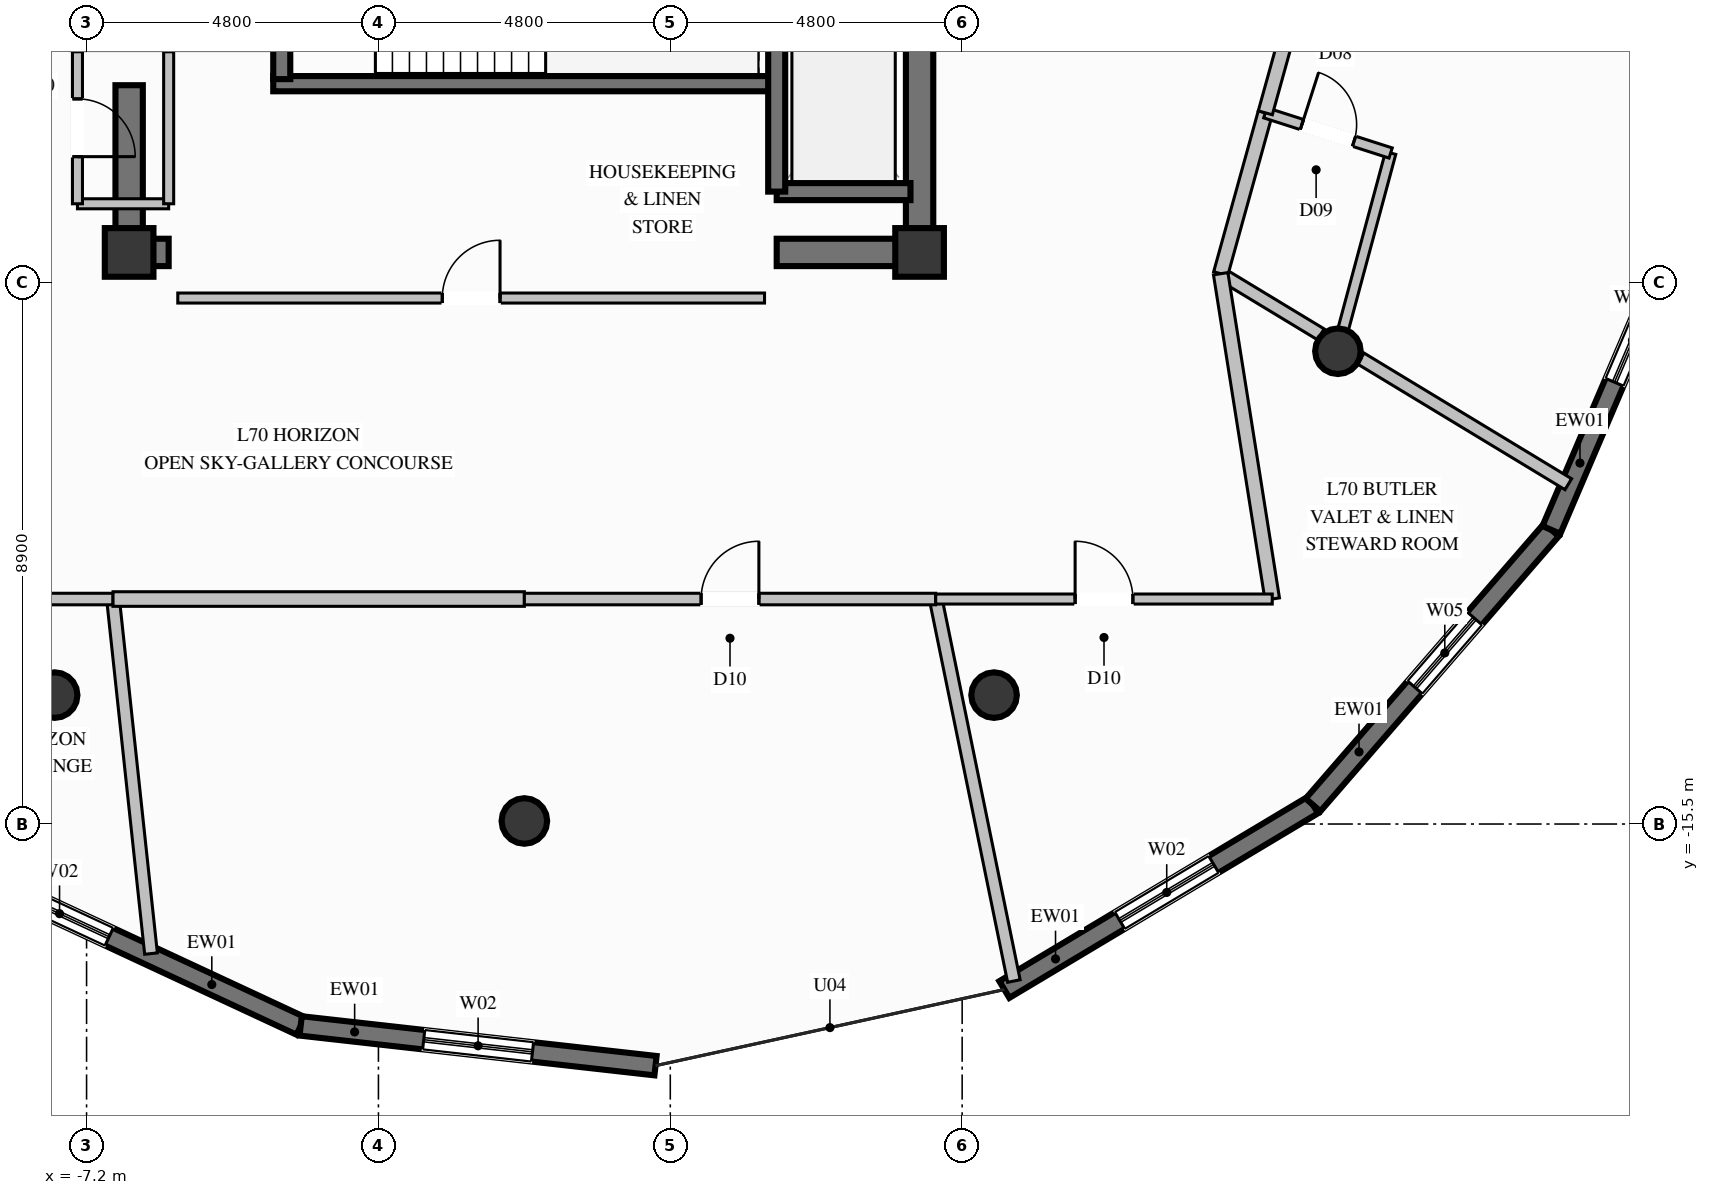
"""IFC4 building model, lengths in metres.
Left out: names, types, materials, properties, quantities, classifications, styles, units other than length and angle.
Written with IfcOpenShell. Run it as: python <this file> out.ifc"""

import sys

from ifc_helpers import new_model, si_unit, direction, frame, frame_2d, origin, origin_2d, place, context, subcontext, project, spatial, rectangle, circle, extrude, element, fill, save


model = new_model("IFC4")
c1 = context("Model", 3, precision=1e-05, world=origin(), true_north=direction((0.0, 1.0)))
c2 = subcontext(c1, "Body", "Model", "MODEL_VIEW")
j1 = project(units=[si_unit("LENGTHUNIT", "METRE"), si_unit("PLANEANGLEUNIT", "RADIAN")], contexts=[c1])
p1 = place(None, origin())
s1 = spatial("IfcSite", under=j1, at=p1, CompositionType="ELEMENT")
p2 = place(p1, origin())
s2 = spatial("IfcBuilding", under=s1, at=p2, CompositionType="ELEMENT")
p3 = place(p2, frame((0.0, 0.0, 270.6)))
s3 = spatial("IfcBuildingStorey", under=s2, at=p3, CompositionType="ELEMENT", Elevation=270.6)
for number, where, z_axis, x_axis in (
    (1, (-6.5, -6.1, 0.0), (0.0, 0.0, 1.0), (1.0, 0.0, 0.0)),
    (2, (6.5, -6.1, 0.0), (0.0, 0.0, 1.0), (1.0, 0.0, 0.0)),
):
    element("IfcColumn", number, at=place(p3, frame(where, z_axis=z_axis, x_axis=x_axis)), inside=s3, PredefinedType="COLUMN", context=c2, shape_type="SweptSolid", body=[
        extrude(rectangle(XDim=0.8, YDim=0.8, at=origin_2d()), origin(), (0.0, 0.0, 1.0), 3.8),
    ])
p4 = place(p3, frame((-4.13, -3.325, 0.0), z_axis=(0.0, 0.0, 1.0), x_axis=(1.0, 0.0, 0.0)))
e3 = element("IfcWall", 3, at=p4, inside=s3, PredefinedType="SOLIDWALL", context=c2, shape_type="SweptSolid", body=[
    extrude(rectangle(XDim=8.26, YDim=0.25, at=frame_2d((4.13, 0.0))), origin(), (0.0, 0.0, 1.0), 3.8),
])
p5 = place(p3, frame((-6.275, -6.1, 0.0), z_axis=(0.0, 0.0, 1.0), x_axis=(1.0, 0.0, 0.0)))
e4 = element("IfcWall", 4, at=p5, inside=s3, PredefinedType="SHEAR", context=c2, shape_type="SweptSolid", body=[
    extrude(rectangle(XDim=0.425, YDim=0.45, at=frame_2d((0.212, 0.0))), origin(), (0.0, 0.0, 1.0), 3.8),
])
p6 = place(p3, frame((4.15, -6.1, 0.0), z_axis=(0.0, 0.0, 1.0), x_axis=(1.0, 0.0, 0.0)))
e5 = element("IfcWall", 5, at=p6, inside=s3, PredefinedType="SHEAR", context=c2, shape_type="SweptSolid", body=[
    extrude(rectangle(XDim=2.125, YDim=0.45, at=frame_2d((1.062, 0.0))), origin(), (0.0, 0.0, 1.0), 3.8),
])
p7 = place(p3, frame((-6.5, -6.325, 0.0), z_axis=(0.0, 0.0, 1.0), x_axis=(0.0, 1.0, 0.0)))
e6 = element("IfcWall", 6, at=p7, inside=s3, PredefinedType="SHEAR", context=c2, shape_type="SweptSolid", body=[
    extrude(rectangle(XDim=2.975, YDim=0.45, at=frame_2d((1.487, 0.0))), origin(), (0.0, 0.0, 1.0), 3.8),
])
p8 = place(p3, frame((6.5, -6.325, 0.0), z_axis=(0.0, 0.0, 1.0), x_axis=(0.0, 1.0, 0.0)))
e7 = element("IfcWall", 7, at=p8, inside=s3, PredefinedType="SHEAR", context=c2, shape_type="SweptSolid", body=[
    extrude(rectangle(XDim=3.975, YDim=0.45, at=frame_2d((1.987, 0.0))), origin(), (0.0, 0.0, 1.0), 3.8),
])
for number, where, z_axis, x_axis in (
    (8, (-7.725, -13.38, 0.0), (0.0, 0.0, 1.0), (1.0, 0.0, 0.0)),
    (9, (0.0, -15.45, 0.0), (0.0, 0.0, 1.0), (1.0, 0.0, 0.0)),
    (10, (7.725, -13.38, 0.0), (0.0, 0.0, 1.0), (1.0, 0.0, 0.0)),
    (11, (13.38, -7.725, 0.0), (0.0, 0.0, 1.0), (1.0, 0.0, 0.0)),
):
    element("IfcColumn", number, at=place(p3, frame(where, z_axis=z_axis, x_axis=x_axis)), inside=s3, PredefinedType="COLUMN", context=c2, shape_type="SweptSolid", body=[
        extrude(circle(Radius=0.375, at=origin_2d()), origin(), (0.0, 0.0, 1.0), 3.8),
    ])
p9 = place(p3, frame((12.971, -15.186, 0.0), z_axis=(0.0, 0.0, 1.0), x_axis=(-0.858256729209, -0.513220602439, 0.0)))
e12 = element("IfcWall", 12, at=p9, inside=s3, PredefinedType="SOLIDWALL", context=c2, shape_type="SweptSolid", body=[
    extrude(rectangle(XDim=5.915, YDim=0.32, at=frame_2d((2.958, 0.0))), origin(), (0.0, 0.0, 1.0), 3.57),
])
p10 = place(p9, frame((1.904, 0.0, 0.35)))
e13 = element("IfcOpeningElement", 13, at=p10, cuts=e12, PredefinedType="OPENING", context=c2, shape_type="SweptSolid", body=[
    extrude(rectangle(XDim=1.8, YDim=2.6, at=frame_2d((0.9, 1.3))), frame((0.0, 0.17, 0.0), z_axis=(0.0, -1.0, 0.0), x_axis=(1.0, 0.0, 0.0)), (0.0, 0.0, 1.0), 0.34),
])
p11 = place(p3, frame((16.891, -10.663, 0.0), z_axis=(0.0, 0.0, 1.0), x_axis=(-0.654956937311, -0.755666202941, 0.0)))
e14 = element("IfcWall", 14, at=p11, inside=s3, PredefinedType="SOLIDWALL", context=c2, shape_type="SweptSolid", body=[
    extrude(rectangle(XDim=5.985, YDim=0.32, at=frame_2d((2.993, 0.0))), origin(), (0.0, 0.0, 1.0), 3.57),
])
p12 = place(p11, frame((1.927, 0.0, 0.85)))
e15 = element("IfcOpeningElement", 15, at=p12, cuts=e14, PredefinedType="OPENING", context=c2, shape_type="SweptSolid", body=[
    extrude(rectangle(XDim=1.5, YDim=1.2, at=frame_2d((0.75, 0.6))), frame((0.0, 0.17, 0.0), z_axis=(0.0, -1.0, 0.0), x_axis=(1.0, 0.0, 0.0)), (0.0, 0.0, 1.0), 0.34),
])
p13 = place(p3, frame((19.27, -5.097, 0.0), z_axis=(0.0, 0.0, 1.0), x_axis=(-0.392999104836, -0.919538853773, 0.0)))
e16 = element("IfcWall", 16, at=p13, inside=s3, PredefinedType="SOLIDWALL", context=c2, shape_type="SweptSolid", body=[
    extrude(rectangle(XDim=6.053, YDim=0.32, at=frame_2d((3.027, 0.0))), origin(), (0.0, 0.0, 1.0), 3.57),
])
p14 = place(p13, frame((1.912, 0.0, 0.85)))
e17 = element("IfcOpeningElement", 17, at=p14, cuts=e16, PredefinedType="OPENING", context=c2, shape_type="SweptSolid", body=[
    extrude(rectangle(XDim=1.5, YDim=1.2, at=frame_2d((0.75, 0.6))), frame((0.0, 0.17, 0.0), z_axis=(0.0, -1.0, 0.0), x_axis=(1.0, 0.0, 0.0)), (0.0, 0.0, 1.0), 0.34),
])
p15 = place(p3, frame((-3.679, -18.82, 0.0), z_axis=(0.0, 0.0, 1.0), x_axis=(-0.90661391217, 0.421961152548, 0.0)))
e18 = element("IfcWall", 18, at=p15, inside=s3, PredefinedType="SOLIDWALL", context=c2, shape_type="SweptSolid", body=[
    extrude(rectangle(XDim=5.916, YDim=0.32, at=frame_2d((2.958, 0.0))), origin(), (0.0, 0.0, 1.0), 3.57),
])
p16 = place(p15, frame((3.474, 0.0, 0.35)))
e19 = element("IfcOpeningElement", 19, at=p16, cuts=e18, PredefinedType="OPENING", context=c2, shape_type="SweptSolid", body=[
    extrude(rectangle(XDim=1.8, YDim=2.6, at=frame_2d((0.9, 1.3))), frame((0.0, 0.17, 0.0), z_axis=(0.0, -1.0, 0.0), x_axis=(1.0, 0.0, 0.0)), (0.0, 0.0, 1.0), 0.34),
])
p17 = place(p3, frame((2.157, -19.474, 0.0), z_axis=(0.0, 0.0, 1.0), x_axis=(-0.993778337548, 0.111376010973, 0.0)))
e20 = element("IfcWall", 20, at=p17, inside=s3, PredefinedType="SOLIDWALL", context=c2, shape_type="SweptSolid", body=[
    extrude(rectangle(XDim=5.873, YDim=0.32, at=frame_2d((2.936, 0.0))), origin(), (0.0, 0.0, 1.0), 3.57),
])
p18 = place(p17, frame((2.036, 0.0, 0.35)))
e21 = element("IfcOpeningElement", 21, at=p18, cuts=e20, PredefinedType="OPENING", context=c2, shape_type="SweptSolid", body=[
    extrude(rectangle(XDim=1.8, YDim=2.6, at=frame_2d((0.9, 1.3))), frame((0.0, 0.17, 0.0), z_axis=(0.0, -1.0, 0.0), x_axis=(1.0, 0.0, 0.0)), (0.0, 0.0, 1.0), 0.34),
])
p19 = place(p3, frame((4.15, -5.1, 0.0), z_axis=(0.0, 0.0, 1.0), x_axis=(1.0, 0.0, 0.0)))
e22 = element("IfcWall", 22, at=p19, inside=s3, PredefinedType="SOLIDWALL", context=c2, shape_type="SweptSolid", body=[
    extrude(rectangle(XDim=2.2, YDim=0.28, at=frame_2d((1.1, 0.0))), origin(), (0.0, 0.0, 1.0), 3.57),
])
p20 = place(p3, frame((4.15, -2.4, 0.0), z_axis=(0.0, 0.0, 1.0), x_axis=(0.0, -1.0, 0.0)))
e23 = element("IfcWall", 23, at=p20, inside=s3, PredefinedType="SOLIDWALL", context=c2, shape_type="SweptSolid", body=[
    extrude(rectangle(XDim=2.7, YDim=0.28, at=frame_2d((1.35, 0.0))), origin(), (0.0, 0.0, 1.0), 3.57),
])
p21 = place(p3, frame((-3.99, -3.25, 0.0), z_axis=(0.0, 0.0, 1.0), x_axis=(0.0, 1.0, 0.0)))
e24 = element("IfcWall", 24, at=p21, inside=s3, PredefinedType="SOLIDWALL", context=c2, shape_type="SweptSolid", body=[
    extrude(rectangle(XDim=5.46, YDim=0.28, at=frame_2d((2.73, 0.0))), origin(), (0.0, 0.0, 1.0), 3.57),
])
p22 = place(p21, frame((0.937, 0.0, 0.0)))
e25 = element("IfcOpeningElement", 25, at=p22, cuts=e24, PredefinedType="OPENING", context=c2, shape_type="SweptSolid", body=[
    extrude(rectangle(XDim=1.2, YDim=2.2, at=frame_2d((0.6, 1.1))), frame((0.0, 0.15, 0.0), z_axis=(0.0, -1.0, 0.0), x_axis=(1.0, 0.0, 0.0)), (0.0, 0.0, 1.0), 0.3),
])
p23 = place(p3, frame((-7.35, -5.3, 0.0), z_axis=(0.0, 0.0, 1.0), x_axis=(1.0, 0.0, 0.0)))
e26 = element("IfcWall", 26, at=p23, inside=s3, PredefinedType="PARTITIONING", context=c2, shape_type="SweptSolid", body=[
    extrude(rectangle(XDim=1.5, YDim=0.165, at=frame_2d((0.75, 0.0))), origin(), (0.0, 0.0, 1.0), 2.655),
])
p24 = place(p3, frame((-5.85, -5.3, 0.0), z_axis=(0.0, 0.0, 1.0), x_axis=(0.0, 1.0, 0.0)))
e27 = element("IfcWall", 27, at=p24, inside=s3, PredefinedType="PARTITIONING", context=c2, shape_type="SweptSolid", body=[
    extrude(rectangle(XDim=2.5, YDim=0.165, at=frame_2d((1.25, 0.0))), origin(), (0.0, 0.0, 1.0), 2.655),
])
p25 = place(p3, frame((-7.35, -2.8, 0.0), z_axis=(0.0, 0.0, 1.0), x_axis=(0.0, -1.0, 0.0)))
e28 = element("IfcWall", 28, at=p25, inside=s3, PredefinedType="PARTITIONING", context=c2, shape_type="SweptSolid", body=[
    extrude(rectangle(XDim=2.5, YDim=0.165, at=frame_2d((1.25, 0.0))), origin(), (0.0, 0.0, 1.0), 3.57),
])
p26 = place(p25, frame((0.775, 0.0, 0.0)))
e29 = element("IfcOpeningElement", 29, at=p26, cuts=e28, PredefinedType="OPENING", context=c2, shape_type="SweptSolid", body=[
    extrude(rectangle(XDim=0.95, YDim=2.1, at=frame_2d((0.475, 1.05))), frame((0.0, 0.093, 0.0), z_axis=(0.0, -1.0, 0.0), x_axis=(1.0, 0.0, 0.0)), (0.0, 0.0, 1.0), 0.185),
])
p27 = place(p3, frame((-5.7, -6.85, 0.0), z_axis=(0.0, 0.0, 1.0), x_axis=(1.0, 0.0, 0.0)))
e30 = element("IfcWall", 30, at=p27, inside=s3, PredefinedType="PARTITIONING", context=c2, shape_type="SweptSolid", body=[
    extrude(rectangle(XDim=9.65, YDim=0.165, at=frame_2d((4.825, 0.0))), origin(), (0.0, 0.0, 1.0), 2.655),
])
p28 = place(p27, frame((4.35, 0.0, 0.0)))
e31 = element("IfcOpeningElement", 31, at=p28, cuts=e30, PredefinedType="OPENING", context=c2, shape_type="SweptSolid", body=[
    extrude(rectangle(XDim=0.95, YDim=2.1, at=frame_2d((0.475, 1.05))), frame((0.0, 0.093, 0.0), z_axis=(0.0, -1.0, 0.0), x_axis=(1.0, 0.0, 0.0)), (0.0, 0.0, 1.0), 0.185),
])
p29 = place(p3, frame((11.452, -6.45, 0.0), z_axis=(0.0, 0.0, 1.0), x_axis=(0.85548381957, -0.517829541889, 0.0)))
e32 = element("IfcWall", 32, at=p29, inside=s3, PredefinedType="PARTITIONING", context=c2, shape_type="SweptSolid", body=[
    extrude(rectangle(XDim=1.926, YDim=0.21, at=frame_2d((0.963, 0.0))), origin(), (0.0, 0.0, 1.0), 3.011),
])
p30 = place(p3, frame((13.756, -7.845, 0.0), z_axis=(0.0, 0.0, 1.0), x_axis=(0.855336694692, -0.518072522638, 0.0)))
e33 = element("IfcWall", 33, at=p30, inside=s3, PredefinedType="PARTITIONING", context=c2, shape_type="SweptSolid", body=[
    extrude(rectangle(XDim=3.99, YDim=0.21, at=frame_2d((1.995, 0.0))), origin(), (0.0, 0.0, 1.0), 3.57),
])
p31 = place(p3, frame((11.452, -6.45, 0.0), z_axis=(0.0, 0.0, 1.0), x_axis=(0.267350374135, 0.963599386389, 0.0)))
e34 = element("IfcWall", 34, at=p31, inside=s3, PredefinedType="PARTITIONING", context=c2, shape_type="SweptSolid", body=[
    extrude(rectangle(XDim=2.746, YDim=0.24, at=frame_2d((1.373, 0.0))), origin(), (0.0, 0.0, 1.0), 3.57),
])
p32 = place(p3, frame((13.396, -7.627, 0.0), z_axis=(0.0, 0.0, 1.0), x_axis=(0.259917321364, 0.965630874638, 0.0)))
e35 = element("IfcWall", 35, at=p32, inside=s3, PredefinedType="PLUMBINGWALL", context=c2, shape_type="SweptSolid", body=[
    extrude(rectangle(XDim=3.274, YDim=0.175, at=frame_2d((1.637, 0.0))), origin(), (0.0, 0.0, 1.0), 3.138),
])
p33 = place(p3, frame((12.186, -3.804, 0.0), z_axis=(0.0, 0.0, 1.0), x_axis=(0.952209126852, -0.305446850926, 0.0)))
e36 = element("IfcWall", 36, at=p33, inside=s3, PredefinedType="PLUMBINGWALL", context=c2, shape_type="SweptSolid", body=[
    extrude(rectangle(XDim=2.165, YDim=0.175, at=frame_2d((1.082, 0.0))), origin(), (0.0, 0.0, 1.0), 3.57),
])
p34 = place(p33, frame((0.632, 0.0, 0.0)))
e37 = element("IfcOpeningElement", 37, at=p34, cuts=e36, PredefinedType="OPENING", context=c2, shape_type="SweptSolid", body=[
    extrude(rectangle(XDim=0.9, YDim=2.1, at=frame_2d((0.45, 1.05))), frame((0.0, 0.098, 0.0), z_axis=(0.0, -1.0, 0.0), x_axis=(1.0, 0.0, 0.0)), (0.0, 0.0, 1.0), 0.195),
])
p35 = place(p3, frame((12.186, -3.804, 0.0), z_axis=(0.0, 0.0, 1.0), x_axis=(0.267374891444, 0.963592583733, 0.0)))
e38 = element("IfcWall", 38, at=p35, inside=s3, PredefinedType="PARTITIONING", context=c2, shape_type="SweptSolid", body=[
    extrude(rectangle(XDim=3.792, YDim=0.24, at=frame_2d((1.896, 0.0))), origin(), (0.0, 0.0, 1.0), 3.57),
])
p36 = place(p35, frame((1.346, 0.0, 0.0)))
e39 = element("IfcOpeningElement", 39, at=p36, cuts=e38, PredefinedType="OPENING", context=c2, shape_type="SweptSolid", body=[
    extrude(rectangle(XDim=1.1, YDim=2.3, at=frame_2d((0.55, 1.15))), frame((0.0, 0.13, 0.0), z_axis=(0.0, -1.0, 0.0), x_axis=(1.0, 0.0, 0.0)), (0.0, 0.0, 1.0), 0.26),
])
p37 = place(p3, frame((-6.765, -11.8, 0.0), z_axis=(0.0, 0.0, 1.0), x_axis=(0.106574281644, -0.994304743271, 0.0)))
e40 = element("IfcWall", 40, at=p37, inside=s3, PredefinedType="PARTITIONING", context=c2, shape_type="SweptSolid", body=[
    extrude(rectangle(XDim=5.865, YDim=0.21, at=frame_2d((2.932, 0.0))), origin(), (0.0, 0.0, 1.0), 3.57),
])
p38 = place(p3, frame((-12.3, -11.8, 0.0), z_axis=(0.0, 0.0, 1.0), x_axis=(1.0, 0.0, 0.0)))
e41 = element("IfcWall", 41, at=p38, inside=s3, PredefinedType="PARTITIONING", context=c2, shape_type="SweptSolid", body=[
    extrude(rectangle(XDim=5.535, YDim=0.19, at=frame_2d((2.768, 0.0))), origin(), (0.0, 0.0, 1.0), 3.57),
])
p39 = place(p38, frame((2.293, 0.0, 0.0)))
e42 = element("IfcOpeningElement", 42, at=p39, cuts=e41, PredefinedType="OPENING", context=c2, shape_type="SweptSolid", body=[
    extrude(rectangle(XDim=0.95, YDim=2.1, at=frame_2d((0.475, 1.05))), frame((0.0, 0.105, 0.0), z_axis=(0.0, -1.0, 0.0), x_axis=(1.0, 0.0, 0.0)), (0.0, 0.0, 1.0), 0.21),
])
p40 = place(p3, frame((6.765, -11.8, 0.0), z_axis=(0.0, 0.0, 1.0), x_axis=(0.200573143294, -0.979678730089, 0.0)))
e43 = element("IfcWall", 43, at=p40, inside=s3, PredefinedType="PARTITIONING", context=c2, shape_type="SweptSolid", body=[
    extrude(rectangle(XDim=6.412, YDim=0.21, at=frame_2d((3.206, 0.0))), origin(), (0.0, 0.0, 1.0), 3.011),
])
p41 = place(p3, frame((-6.765, -11.8, 0.0), z_axis=(0.0, 0.0, 1.0), x_axis=(1.0, 0.0, 0.0)))
e44 = element("IfcWall", 44, at=p41, inside=s3, PredefinedType="PARTITIONING", context=c2, shape_type="SweptSolid", body=[
    extrude(rectangle(XDim=6.765, YDim=0.24, at=frame_2d((3.382, 0.0))), origin(), (0.0, 0.0, 1.0), 3.57),
])
p42 = place(p3, frame((0.0, -11.8, 0.0), z_axis=(0.0, 0.0, 1.0), x_axis=(1.0, 0.0, 0.0)))
e45 = element("IfcWall", 45, at=p42, inside=s3, PredefinedType="PARTITIONING", context=c2, shape_type="SweptSolid", body=[
    extrude(rectangle(XDim=6.765, YDim=0.19, at=frame_2d((3.382, 0.0))), origin(), (0.0, 0.0, 1.0), 3.57),
])
p43 = place(p42, frame((2.907, 0.0, 0.0)))
e46 = element("IfcOpeningElement", 46, at=p43, cuts=e45, PredefinedType="OPENING", context=c2, shape_type="SweptSolid", body=[
    extrude(rectangle(XDim=0.95, YDim=2.1, at=frame_2d((0.475, 1.05))), frame((0.0, 0.105, 0.0), z_axis=(0.0, -1.0, 0.0), x_axis=(1.0, 0.0, 0.0)), (0.0, 0.0, 1.0), 0.21),
])
p44 = place(p3, frame((12.3, -11.8, 0.0), z_axis=(0.0, 0.0, 1.0), x_axis=(-0.156573548098, 0.987666301964, 0.0)))
e47 = element("IfcWall", 47, at=p44, inside=s3, PredefinedType="PARTITIONING", context=c2, shape_type="SweptSolid", body=[
    extrude(rectangle(XDim=5.417, YDim=0.24, at=frame_2d((2.708, 0.0))), origin(), (0.0, 0.0, 1.0), 3.57),
])
p45 = place(p3, frame((6.765, -11.8, 0.0), z_axis=(0.0, 0.0, 1.0), x_axis=(1.0, 0.0, 0.0)))
e48 = element("IfcWall", 48, at=p45, inside=s3, PredefinedType="PARTITIONING", context=c2, shape_type="SweptSolid", body=[
    extrude(rectangle(XDim=5.535, YDim=0.165, at=frame_2d((2.768, 0.0))), origin(), (0.0, 0.0, 1.0), 3.57),
])
p46 = place(p45, frame((2.293, 0.0, 0.0)))
e49 = element("IfcOpeningElement", 49, at=p46, cuts=e48, PredefinedType="OPENING", context=c2, shape_type="SweptSolid", body=[
    extrude(rectangle(XDim=0.95, YDim=2.1, at=frame_2d((0.475, 1.05))), frame((0.0, 0.093, 0.0), z_axis=(0.0, -1.0, 0.0), x_axis=(1.0, 0.0, 0.0)), (0.0, 0.0, 1.0), 0.185),
])
p47 = place(p10, origin())
e50 = element("IfcWindow", 50, at=p47, inside=s3, PartitioningType="SINGLE_PANEL", PredefinedType="WINDOW", context=c2, shape_type="SweptSolid", body=[
    extrude(rectangle(XDim=1.8, YDim=2.6, at=frame_2d((0.9, 1.3))), frame((0.0, 0.03, 0.0), z_axis=(0.0, -1.0, 0.0), x_axis=(1.0, 0.0, 0.0)), (0.0, 0.0, 1.0), 0.06),
])
fill(e13, e50)
p48 = place(p12, origin())
e51 = element("IfcWindow", 51, at=p48, inside=s3, PartitioningType="SINGLE_PANEL", PredefinedType="WINDOW", context=c2, shape_type="SweptSolid", body=[
    extrude(rectangle(XDim=1.5, YDim=1.2, at=frame_2d((0.75, 0.6))), frame((0.0, 0.03, 0.0), z_axis=(0.0, -1.0, 0.0), x_axis=(1.0, 0.0, 0.0)), (0.0, 0.0, 1.0), 0.06),
])
fill(e15, e51)
p49 = place(p14, origin())
e52 = element("IfcWindow", 52, at=p49, inside=s3, PartitioningType="SINGLE_PANEL", PredefinedType="WINDOW", context=c2, shape_type="SweptSolid", body=[
    extrude(rectangle(XDim=1.5, YDim=1.2, at=frame_2d((0.75, 0.6))), frame((0.0, 0.03, 0.0), z_axis=(0.0, -1.0, 0.0), x_axis=(1.0, 0.0, 0.0)), (0.0, 0.0, 1.0), 0.06),
])
fill(e17, e52)
p50 = place(p16, origin())
e53 = element("IfcWindow", 53, at=p50, inside=s3, PartitioningType="SINGLE_PANEL", PredefinedType="WINDOW", context=c2, shape_type="SweptSolid", body=[
    extrude(rectangle(XDim=1.8, YDim=2.6, at=frame_2d((0.9, 1.3))), frame((0.0, 0.03, 0.0), z_axis=(0.0, -1.0, 0.0), x_axis=(1.0, 0.0, 0.0)), (0.0, 0.0, 1.0), 0.06),
])
fill(e19, e53)
p51 = place(p18, origin())
e54 = element("IfcWindow", 54, at=p51, inside=s3, PartitioningType="SINGLE_PANEL", PredefinedType="WINDOW", context=c2, shape_type="SweptSolid", body=[
    extrude(rectangle(XDim=1.8, YDim=2.6, at=frame_2d((0.9, 1.3))), frame((0.0, 0.03, 0.0), z_axis=(0.0, -1.0, 0.0), x_axis=(1.0, 0.0, 0.0)), (0.0, 0.0, 1.0), 0.06),
])
fill(e21, e54)
p52 = place(p26, origin())
e55 = element("IfcDoor", 55, at=p52, inside=s3, OperationType="SINGLE_SWING_RIGHT", PredefinedType="DOOR", context=c2, shape_type="SweptSolid", body=[
    extrude(rectangle(XDim=0.95, YDim=2.1, at=frame_2d((0.475, 1.05))), frame((0.0, 0.025, 0.0), z_axis=(0.0, -1.0, 0.0), x_axis=(1.0, 0.0, 0.0)), (0.0, 0.0, 1.0), 0.05),
])
fill(e29, e55)
p53 = place(p28, origin())
e56 = element("IfcDoor", 56, at=p53, inside=s3, OperationType="SINGLE_SWING_RIGHT", PredefinedType="DOOR", context=c2, shape_type="SweptSolid", body=[
    extrude(rectangle(XDim=0.95, YDim=2.1, at=frame_2d((0.475, 1.05))), frame((0.0, 0.025, 0.0), z_axis=(0.0, -1.0, 0.0), x_axis=(1.0, 0.0, 0.0)), (0.0, 0.0, 1.0), 0.05),
])
fill(e31, e56)
p54 = place(p34, origin())
e57 = element("IfcDoor", 57, at=p54, inside=s3, OperationType="SINGLE_SWING_LEFT", PredefinedType="DOOR", context=c2, shape_type="SweptSolid", body=[
    extrude(rectangle(XDim=0.9, YDim=2.1, at=frame_2d((0.45, 1.05))), frame((0.0, 0.025, 0.0), z_axis=(0.0, -1.0, 0.0), x_axis=(1.0, 0.0, 0.0)), (0.0, 0.0, 1.0), 0.05),
])
fill(e37, e57)
p55 = place(p43, origin())
e58 = element("IfcDoor", 58, at=p55, inside=s3, OperationType="SINGLE_SWING_RIGHT", PredefinedType="DOOR", context=c2, shape_type="SweptSolid", body=[
    extrude(rectangle(XDim=0.95, YDim=2.1, at=frame_2d((0.475, 1.05))), frame((0.0, 0.025, 0.0), z_axis=(0.0, -1.0, 0.0), x_axis=(1.0, 0.0, 0.0)), (0.0, 0.0, 1.0), 0.05),
])
fill(e46, e58)
p56 = place(p46, origin())
e59 = element("IfcDoor", 59, at=p56, inside=s3, OperationType="SINGLE_SWING_LEFT", PredefinedType="DOOR", context=c2, shape_type="SweptSolid", body=[
    extrude(rectangle(XDim=0.95, YDim=2.1, at=frame_2d((0.475, 1.05))), frame((0.0, 0.025, 0.0), z_axis=(0.0, -1.0, 0.0), x_axis=(1.0, 0.0, 0.0)), (0.0, 0.0, 1.0), 0.05),
])
fill(e49, e59)
save(model, sys.argv[1])
